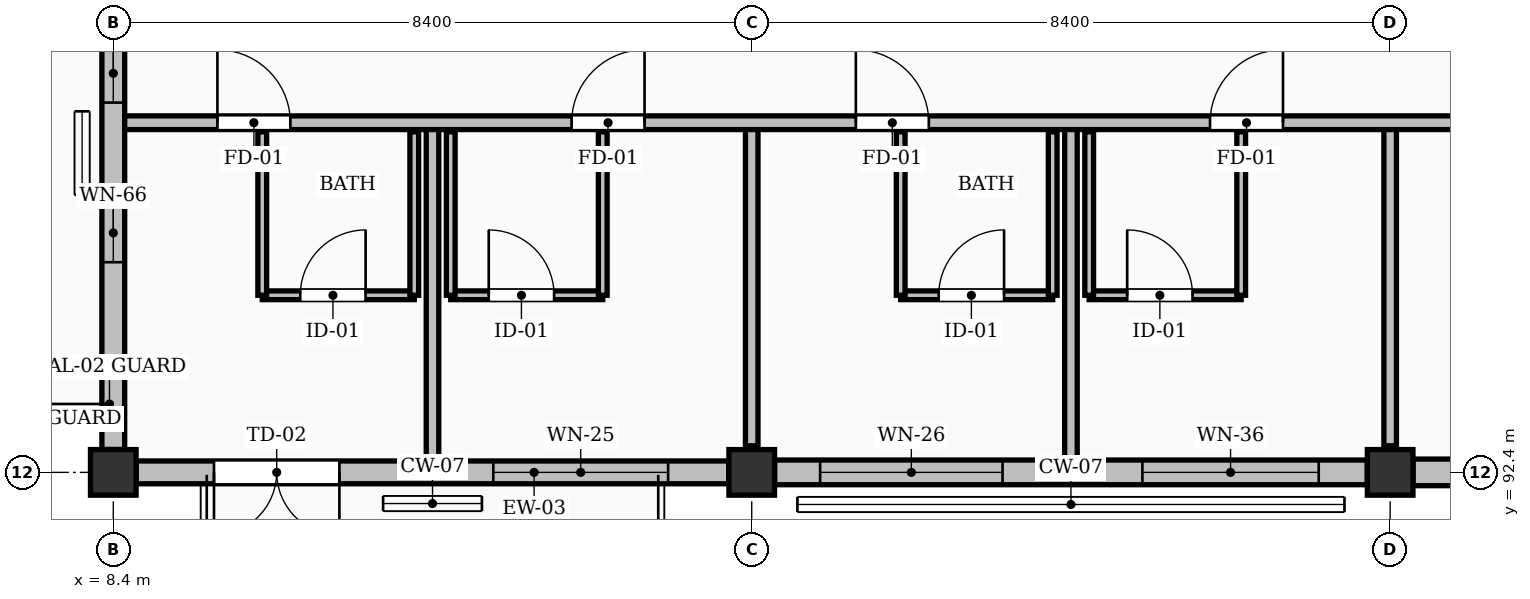
"""IFC4 building model, lengths in metres.
Left out: names, types, materials, properties, quantities, classifications, styles, units other than length and angle.
Written with IfcOpenShell. Run it as: python <this file> out.ifc"""

import sys

from ifc_helpers import new_model, si_unit, direction, frame, frame_2d, origin, origin_2d, place, context, subcontext, project, spatial, rectangle, extrude, element, fill, save


model = new_model("IFC4")
c1 = context("Model", 3, precision=1e-05, world=origin(), true_north=direction((0.0, 1.0)))
c2 = subcontext(c1, "Body", "Model", "MODEL_VIEW")
j1 = project(units=[si_unit("LENGTHUNIT", "METRE"), si_unit("PLANEANGLEUNIT", "RADIAN")], contexts=[c1])
p1 = place(None, origin())
s1 = spatial("IfcSite", under=j1, at=p1, CompositionType="ELEMENT")
p2 = place(p1, origin())
s2 = spatial("IfcBuilding", under=s1, at=p2, CompositionType="ELEMENT")
p3 = place(p2, frame((0.0, 0.0, 28.56)))
s3 = spatial("IfcBuildingStorey", under=s2, at=p3, CompositionType="ELEMENT", Elevation=28.56)
for number, where, z_axis, x_axis in (
    (1, (8.4, 92.4, 0.0), (0.0, 0.0, 1.0), (1.0, 0.0, 0.0)),
    (2, (16.8, 92.4, 0.0), (0.0, 0.0, 1.0), (1.0, 0.0, 0.0)),
    (3, (25.2, 92.4, 0.0), (0.0, 0.0, 1.0), (1.0, 0.0, 0.0)),
):
    element("IfcColumn", number, at=place(p3, frame(where, z_axis=z_axis, x_axis=x_axis)), inside=s3, PredefinedType="COLUMN", context=c2, shape_type="SweptSolid", body=[
        extrude(rectangle(XDim=0.6, YDim=0.6, at=origin_2d()), origin(), (0.0, 0.0, 1.0), 3.36),
    ])
p4 = place(p3, frame((8.701, 92.4, 0.0), z_axis=(0.0, 0.0, 1.0), x_axis=(1.0, 0.0, 0.0)))
e4 = element("IfcWall", 4, at=p4, inside=s3, PredefinedType="SOLIDWALL", context=c2, shape_type="SweptSolid", body=[
    extrude(rectangle(XDim=7.798, YDim=0.3, at=frame_2d((3.899, 0.0))), origin(), (0.0, 0.0, 1.0), 2.494),
])
p5 = place(p4, frame((1.024, 0.0, 0.0)))
e5 = element("IfcOpeningElement", 5, at=p5, cuts=e4, PredefinedType="OPENING", context=c2, shape_type="SweptSolid", body=[
    extrude(rectangle(XDim=1.65, YDim=2.08, at=frame_2d((0.825, 1.04))), frame((0.0, 0.16, 0.0), z_axis=(0.0, -1.0, 0.0), x_axis=(1.0, 0.0, 0.0)), (0.0, 0.0, 1.0), 0.32),
])
p6 = place(p4, frame((4.699, 0.0, 0.25)))
e6 = element("IfcOpeningElement", 6, at=p6, cuts=e4, PredefinedType="OPENING", context=c2, shape_type="SweptSolid", body=[
    extrude(rectangle(XDim=2.3, YDim=1.75, at=frame_2d((1.15, 0.875))), frame((0.0, 0.16, 0.0), z_axis=(0.0, -1.0, 0.0), x_axis=(1.0, 0.0, 0.0)), (0.0, 0.0, 1.0), 0.32),
])
p7 = place(p3, frame((17.101, 92.4, 0.0), z_axis=(0.0, 0.0, 1.0), x_axis=(1.0, 0.0, 0.0)))
e7 = element("IfcWall", 7, at=p7, inside=s3, PredefinedType="SOLIDWALL", context=c2, shape_type="SweptSolid", body=[
    extrude(rectangle(XDim=7.798, YDim=0.325, at=frame_2d((3.899, 0.0))), origin(), (0.0, 0.0, 1.0), 2.494),
])
p8 = place(p7, frame((0.599, 0.0, 0.25)))
e8 = element("IfcOpeningElement", 8, at=p8, cuts=e7, PredefinedType="OPENING", context=c2, shape_type="SweptSolid", body=[
    extrude(rectangle(XDim=2.4, YDim=1.75, at=frame_2d((1.2, 0.875))), frame((0.0, 0.172, 0.0), z_axis=(0.0, -1.0, 0.0), x_axis=(1.0, 0.0, 0.0)), (0.0, 0.0, 1.0), 0.345),
])
p9 = place(p7, frame((4.839, 0.0, 0.25)))
e9 = element("IfcOpeningElement", 9, at=p9, cuts=e7, PredefinedType="OPENING", context=c2, shape_type="SweptSolid", body=[
    extrude(rectangle(XDim=2.32, YDim=1.9, at=frame_2d((1.16, 0.95))), frame((0.0, 0.172, 0.0), z_axis=(0.0, -1.0, 0.0), x_axis=(1.0, 0.0, 0.0)), (0.0, 0.0, 1.0), 0.345),
])
p10 = place(p3, frame((25.501, 92.4, 0.0), z_axis=(0.0, 0.0, 1.0), x_axis=(1.0, 0.0, 0.0)))
e10 = element("IfcWall", 10, at=p10, inside=s3, PredefinedType="SOLIDWALL", context=c2, shape_type="SweptSolid", body=[
    extrude(rectangle(XDim=7.798, YDim=0.35, at=frame_2d((3.899, 0.0))), origin(), (0.0, 0.0, 1.0), 2.494),
])
p11 = place(p10, frame((0.974, 0.0, 0.0)))
e11 = element("IfcOpeningElement", 11, at=p11, cuts=e10, PredefinedType="OPENING", context=c2, shape_type="SweptSolid", body=[
    extrude(rectangle(XDim=1.75, YDim=2.08, at=frame_2d((0.875, 1.04))), frame((0.0, 0.185, 0.0), z_axis=(0.0, -1.0, 0.0), x_axis=(1.0, 0.0, 0.0)), (0.0, 0.0, 1.0), 0.37),
])
p12 = place(p10, frame((4.689, 0.0, 0.25)))
e12 = element("IfcOpeningElement", 12, at=p12, cuts=e10, PredefinedType="OPENING", context=c2, shape_type="SweptSolid", body=[
    extrude(rectangle(XDim=2.32, YDim=1.9, at=frame_2d((1.16, 0.95))), frame((0.0, 0.185, 0.0), z_axis=(0.0, -1.0, 0.0), x_axis=(1.0, 0.0, 0.0)), (0.0, 0.0, 1.0), 0.37),
])
p13 = place(p3, frame((8.4, 92.701, 0.0), z_axis=(0.0, 0.0, 1.0), x_axis=(0.0, 1.0, 0.0)))
e13 = element("IfcWall", 13, at=p13, inside=s3, PredefinedType="SOLIDWALL", context=c2, shape_type="SweptSolid", body=[
    extrude(rectangle(XDim=7.798, YDim=0.3, at=frame_2d((3.899, 0.0))), origin(), (0.0, 0.0, 1.0), 2.494),
])
p14 = place(p13, frame((2.464, 0.0, 0.3)))
e14 = element("IfcOpeningElement", 14, at=p14, cuts=e13, PredefinedType="OPENING", context=c2, shape_type="SweptSolid", body=[
    extrude(rectangle(XDim=0.77, YDim=1.9, at=frame_2d((0.385, 0.95))), frame((0.0, 0.16, 0.0), z_axis=(0.0, -1.0, 0.0), x_axis=(1.0, 0.0, 0.0)), (0.0, 0.0, 1.0), 0.32),
])
p15 = place(p13, frame((4.564, 0.0, 0.3)))
e15 = element("IfcOpeningElement", 15, at=p15, cuts=e13, PredefinedType="OPENING", context=c2, shape_type="SweptSolid", body=[
    extrude(rectangle(XDim=0.77, YDim=1.9, at=frame_2d((0.385, 0.95))), frame((0.0, 0.16, 0.0), z_axis=(0.0, -1.0, 0.0), x_axis=(1.0, 0.0, 0.0)), (0.0, 0.0, 1.0), 0.32),
])
p16 = place(p3, frame((10.36, 94.73, 0.0), z_axis=(0.0, 0.0, 1.0), x_axis=(1.0, 0.0, 0.0)))
e16 = element("IfcWall", 16, at=p16, inside=s3, PredefinedType="PARTITIONING", context=c2, shape_type="SweptSolid", body=[
    extrude(rectangle(XDim=2.0, YDim=0.115, at=frame_2d((1.0, 0.0))), origin(), (0.0, 0.0, 1.0), 3.12),
])
p17 = place(p16, frame((0.5, 0.0, 0.0)))
e17 = element("IfcOpeningElement", 17, at=p17, cuts=e16, PredefinedType="OPENING", context=c2, shape_type="SweptSolid", body=[
    extrude(rectangle(XDim=0.86, YDim=2.05, at=frame_2d((0.43, 1.025))), frame((0.0, 0.067, 0.0), z_axis=(0.0, -1.0, 0.0), x_axis=(1.0, 0.0, 0.0)), (0.0, 0.0, 1.0), 0.135),
])
for number, where, z_axis, x_axis in (
    (18, (10.36, 94.73, 0.0), (0.0, 0.0, 1.0), (0.0, 1.0, 0.0)),
    (19, (12.36, 94.73, 0.0), (0.0, 0.0, 1.0), (0.0, 1.0, 0.0)),
):
    element("IfcWall", number, at=place(p3, frame(where, z_axis=z_axis, x_axis=x_axis)), inside=s3, PredefinedType="PARTITIONING", context=c2, shape_type="SweptSolid", body=[
        extrude(rectangle(XDim=2.15, YDim=0.115, at=frame_2d((1.075, 0.0))), origin(), (0.0, 0.0, 1.0), 3.12),
    ])
p18 = place(p3, frame((12.84, 94.73, 0.0), z_axis=(0.0, 0.0, 1.0), x_axis=(1.0, 0.0, 0.0)))
e20 = element("IfcWall", 20, at=p18, inside=s3, PredefinedType="PARTITIONING", context=c2, shape_type="SweptSolid", body=[
    extrude(rectangle(XDim=2.0, YDim=0.115, at=frame_2d((1.0, 0.0))), origin(), (0.0, 0.0, 1.0), 3.12),
])
p19 = place(p18, frame((0.5, 0.0, 0.0)))
e21 = element("IfcOpeningElement", 21, at=p19, cuts=e20, PredefinedType="OPENING", context=c2, shape_type="SweptSolid", body=[
    extrude(rectangle(XDim=0.86, YDim=2.05, at=frame_2d((0.43, 1.025))), frame((0.0, 0.067, 0.0), z_axis=(0.0, -1.0, 0.0), x_axis=(1.0, 0.0, 0.0)), (0.0, 0.0, 1.0), 0.135),
])
for number, where, z_axis, x_axis in (
    (22, (12.84, 94.73, 0.0), (0.0, 0.0, 1.0), (0.0, 1.0, 0.0)),
    (23, (14.84, 94.73, 0.0), (0.0, 0.0, 1.0), (0.0, 1.0, 0.0)),
):
    element("IfcWall", number, at=place(p3, frame(where, z_axis=z_axis, x_axis=x_axis)), inside=s3, PredefinedType="PARTITIONING", context=c2, shape_type="SweptSolid", body=[
        extrude(rectangle(XDim=2.15, YDim=0.115, at=frame_2d((1.075, 0.0))), origin(), (0.0, 0.0, 1.0), 3.12),
    ])
p20 = place(p3, frame((12.6, 92.55, 0.0), z_axis=(0.0, 0.0, 1.0), x_axis=(0.0, 1.0, 0.0)))
e24 = element("IfcWall", 24, at=p20, inside=s3, PredefinedType="PARTITIONING", context=c2, shape_type="SweptSolid", body=[
    extrude(rectangle(XDim=4.45, YDim=0.165, at=frame_2d((2.225, 0.0))), origin(), (0.0, 0.0, 1.0), 3.12),
])
p21 = place(p3, frame((18.76, 94.73, 0.0), z_axis=(0.0, 0.0, 1.0), x_axis=(1.0, 0.0, 0.0)))
e25 = element("IfcWall", 25, at=p21, inside=s3, PredefinedType="PARTITIONING", context=c2, shape_type="SweptSolid", body=[
    extrude(rectangle(XDim=2.0, YDim=0.115, at=frame_2d((1.0, 0.0))), origin(), (0.0, 0.0, 1.0), 3.12),
])
p22 = place(p21, frame((0.5, 0.0, 0.0)))
e26 = element("IfcOpeningElement", 26, at=p22, cuts=e25, PredefinedType="OPENING", context=c2, shape_type="SweptSolid", body=[
    extrude(rectangle(XDim=0.86, YDim=2.05, at=frame_2d((0.43, 1.025))), frame((0.0, 0.067, 0.0), z_axis=(0.0, -1.0, 0.0), x_axis=(1.0, 0.0, 0.0)), (0.0, 0.0, 1.0), 0.135),
])
p23 = place(p3, frame((18.76, 94.73, 0.0), z_axis=(0.0, 0.0, 1.0), x_axis=(0.0, 1.0, 0.0)))
e27 = element("IfcWall", 27, at=p23, inside=s3, PredefinedType="PARTITIONING", context=c2, shape_type="SweptSolid", body=[
    extrude(rectangle(XDim=2.15, YDim=0.115, at=frame_2d((1.075, 0.0))), origin(), (0.0, 0.0, 1.0), 2.642),
])
p24 = place(p3, frame((20.76, 94.73, 0.0), z_axis=(0.0, 0.0, 1.0), x_axis=(0.0, 1.0, 0.0)))
e28 = element("IfcWall", 28, at=p24, inside=s3, PredefinedType="PARTITIONING", context=c2, shape_type="SweptSolid", body=[
    extrude(rectangle(XDim=2.15, YDim=0.115, at=frame_2d((1.075, 0.0))), origin(), (0.0, 0.0, 1.0), 3.12),
])
p25 = place(p3, frame((21.24, 94.73, 0.0), z_axis=(0.0, 0.0, 1.0), x_axis=(1.0, 0.0, 0.0)))
e29 = element("IfcWall", 29, at=p25, inside=s3, PredefinedType="PARTITIONING", context=c2, shape_type="SweptSolid", body=[
    extrude(rectangle(XDim=2.0, YDim=0.115, at=frame_2d((1.0, 0.0))), origin(), (0.0, 0.0, 1.0), 3.12),
])
p26 = place(p25, frame((0.5, 0.0, 0.0)))
e30 = element("IfcOpeningElement", 30, at=p26, cuts=e29, PredefinedType="OPENING", context=c2, shape_type="SweptSolid", body=[
    extrude(rectangle(XDim=0.86, YDim=2.05, at=frame_2d((0.43, 1.025))), frame((0.0, 0.067, 0.0), z_axis=(0.0, -1.0, 0.0), x_axis=(1.0, 0.0, 0.0)), (0.0, 0.0, 1.0), 0.135),
])
p27 = place(p3, frame((21.24, 94.73, 0.0), z_axis=(0.0, 0.0, 1.0), x_axis=(0.0, 1.0, 0.0)))
e31 = element("IfcWall", 31, at=p27, inside=s3, PredefinedType="PARTITIONING", context=c2, shape_type="SweptSolid", body=[
    extrude(rectangle(XDim=2.15, YDim=0.115, at=frame_2d((1.075, 0.0))), origin(), (0.0, 0.0, 1.0), 3.12),
])
p28 = place(p3, frame((23.24, 94.73, 0.0), z_axis=(0.0, 0.0, 1.0), x_axis=(0.0, 1.0, 0.0)))
e32 = element("IfcWall", 32, at=p28, inside=s3, PredefinedType="PARTITIONING", context=c2, shape_type="SweptSolid", body=[
    extrude(rectangle(XDim=2.15, YDim=0.115, at=frame_2d((1.075, 0.0))), origin(), (0.0, 0.0, 1.0), 2.642),
])
p29 = place(p3, frame((21.0, 92.562, 0.0), z_axis=(0.0, 0.0, 1.0), x_axis=(0.0, 1.0, 0.0)))
e33 = element("IfcWall", 33, at=p29, inside=s3, PredefinedType="PARTITIONING", context=c2, shape_type="SweptSolid", body=[
    extrude(rectangle(XDim=4.438, YDim=0.165, at=frame_2d((2.219, 0.0))), origin(), (0.0, 0.0, 1.0), 3.12),
])
for number, where, z_axis, x_axis in (
    (34, (16.8, 92.75, 0.0), (0.0, 0.0, 1.0), (0.0, 1.0, 0.0)),
    (35, (25.2, 92.75, 0.0), (0.0, 0.0, 1.0), (0.0, 1.0, 0.0)),
):
    element("IfcWall", number, at=place(p3, frame(where, z_axis=z_axis, x_axis=x_axis)), inside=s3, PredefinedType="PARTITIONING", context=c2, shape_type="SweptSolid", body=[
        extrude(rectangle(XDim=4.25, YDim=0.165, at=frame_2d((2.125, 0.0))), origin(), (0.0, 0.0, 1.0), 2.455),
    ])
p30 = place(p3, frame((8.55, 97.0, 0.0), z_axis=(0.0, 0.0, 1.0), x_axis=(1.0, 0.0, 0.0)))
e36 = element("IfcWall", 36, at=p30, inside=s3, PredefinedType="PARTITIONING", context=c2, shape_type="SweptSolid", body=[
    extrude(rectangle(XDim=41.85, YDim=0.18, at=frame_2d((20.925, 0.0))), origin(), (0.0, 0.0, 1.0), 3.12),
])
p31 = place(p30, frame((1.22, 0.0, 0.0)))
e37 = element("IfcOpeningElement", 37, at=p31, cuts=e36, PredefinedType="OPENING", context=c2, shape_type="SweptSolid", body=[
    extrude(rectangle(XDim=0.96, YDim=2.15, at=frame_2d((0.48, 1.075))), frame((0.0, 0.1, 0.0), z_axis=(0.0, -1.0, 0.0), x_axis=(1.0, 0.0, 0.0)), (0.0, 0.0, 1.0), 0.2),
])
p32 = place(p30, frame((5.88, 0.0, 0.0)))
e38 = element("IfcOpeningElement", 38, at=p32, cuts=e36, PredefinedType="OPENING", context=c2, shape_type="SweptSolid", body=[
    extrude(rectangle(XDim=0.96, YDim=2.15, at=frame_2d((0.48, 1.075))), frame((0.0, 0.1, 0.0), z_axis=(0.0, -1.0, 0.0), x_axis=(1.0, 0.0, 0.0)), (0.0, 0.0, 1.0), 0.2),
])
p33 = place(p30, frame((9.62, 0.0, 0.0)))
e39 = element("IfcOpeningElement", 39, at=p33, cuts=e36, PredefinedType="OPENING", context=c2, shape_type="SweptSolid", body=[
    extrude(rectangle(XDim=0.96, YDim=2.15, at=frame_2d((0.48, 1.075))), frame((0.0, 0.1, 0.0), z_axis=(0.0, -1.0, 0.0), x_axis=(1.0, 0.0, 0.0)), (0.0, 0.0, 1.0), 0.2),
])
p34 = place(p30, frame((14.28, 0.0, 0.0)))
e40 = element("IfcOpeningElement", 40, at=p34, cuts=e36, PredefinedType="OPENING", context=c2, shape_type="SweptSolid", body=[
    extrude(rectangle(XDim=0.96, YDim=2.15, at=frame_2d((0.48, 1.075))), frame((0.0, 0.1, 0.0), z_axis=(0.0, -1.0, 0.0), x_axis=(1.0, 0.0, 0.0)), (0.0, 0.0, 1.0), 0.2),
])
p35 = place(p30, frame((18.02, 0.0, 0.0)))
e41 = element("IfcOpeningElement", 41, at=p35, cuts=e36, PredefinedType="OPENING", context=c2, shape_type="SweptSolid", body=[
    extrude(rectangle(XDim=0.96, YDim=2.15, at=frame_2d((0.48, 1.075))), frame((0.0, 0.1, 0.0), z_axis=(0.0, -1.0, 0.0), x_axis=(1.0, 0.0, 0.0)), (0.0, 0.0, 1.0), 0.2),
])
p36 = place(p30, frame((22.68, 0.0, 0.0)))
e42 = element("IfcOpeningElement", 42, at=p36, cuts=e36, PredefinedType="OPENING", context=c2, shape_type="SweptSolid", body=[
    extrude(rectangle(XDim=0.96, YDim=2.15, at=frame_2d((0.48, 1.075))), frame((0.0, 0.1, 0.0), z_axis=(0.0, -1.0, 0.0), x_axis=(1.0, 0.0, 0.0)), (0.0, 0.0, 1.0), 0.2),
])
p37 = place(p30, frame((28.45, 0.0, 0.0)))
e43 = element("IfcOpeningElement", 43, at=p37, cuts=e36, PredefinedType="OPENING", context=c2, shape_type="SweptSolid", body=[
    extrude(rectangle(XDim=1.62, YDim=2.2, at=frame_2d((0.81, 1.1))), frame((0.0, 0.1, 0.0), z_axis=(0.0, -1.0, 0.0), x_axis=(1.0, 0.0, 0.0)), (0.0, 0.0, 1.0), 0.2),
])
p38 = place(p30, frame((34.82, 0.0, 0.0)))
e44 = element("IfcOpeningElement", 44, at=p38, cuts=e36, PredefinedType="OPENING", context=c2, shape_type="SweptSolid", body=[
    extrude(rectangle(XDim=0.96, YDim=2.15, at=frame_2d((0.48, 1.075))), frame((0.0, 0.1, 0.0), z_axis=(0.0, -1.0, 0.0), x_axis=(1.0, 0.0, 0.0)), (0.0, 0.0, 1.0), 0.2),
])
p39 = place(p30, frame((39.48, 0.0, 0.0)))
e45 = element("IfcOpeningElement", 45, at=p39, cuts=e36, PredefinedType="OPENING", context=c2, shape_type="SweptSolid", body=[
    extrude(rectangle(XDim=0.96, YDim=2.15, at=frame_2d((0.48, 1.075))), frame((0.0, 0.1, 0.0), z_axis=(0.0, -1.0, 0.0), x_axis=(1.0, 0.0, 0.0)), (0.0, 0.0, 1.0), 0.2),
])
p40 = place(p5, frame((1.65, 0.0, 0.0), z_axis=(0.0, 0.0, 1.0), x_axis=(-1.0, 0.0, 0.0)))
e46 = element("IfcDoor", 46, at=p40, inside=s3, OperationType="DOUBLE_DOOR_SINGLE_SWING", PredefinedType="DOOR", context=c2, shape_type="SweptSolid", body=[
    extrude(rectangle(XDim=1.65, YDim=2.08, at=frame_2d((0.825, 1.04))), frame((0.0, 0.025, 0.0), z_axis=(0.0, -1.0, 0.0), x_axis=(1.0, 0.0, 0.0)), (0.0, 0.0, 1.0), 0.05),
])
fill(e5, e46)
p41 = place(p6, origin())
e47 = element("IfcWindow", 47, at=p41, inside=s3, PartitioningType="DOUBLE_PANEL_VERTICAL", PredefinedType="WINDOW", context=c2, shape_type="SweptSolid", body=[
    extrude(rectangle(XDim=2.3, YDim=1.75, at=frame_2d((1.15, 0.875))), frame((0.0, 0.03, 0.0), z_axis=(0.0, -1.0, 0.0), x_axis=(1.0, 0.0, 0.0)), (0.0, 0.0, 1.0), 0.06),
])
fill(e6, e47)
p42 = place(p8, origin())
e48 = element("IfcWindow", 48, at=p42, inside=s3, PartitioningType="DOUBLE_PANEL_VERTICAL", PredefinedType="WINDOW", context=c2, shape_type="SweptSolid", body=[
    extrude(rectangle(XDim=2.4, YDim=1.75, at=frame_2d((1.2, 0.875))), frame((0.0, 0.03, 0.0), z_axis=(0.0, -1.0, 0.0), x_axis=(1.0, 0.0, 0.0)), (0.0, 0.0, 1.0), 0.06),
])
fill(e8, e48)
p43 = place(p9, origin())
e49 = element("IfcWindow", 49, at=p43, inside=s3, PartitioningType="DOUBLE_PANEL_VERTICAL", PredefinedType="WINDOW", context=c2, shape_type="SweptSolid", body=[
    extrude(rectangle(XDim=2.32, YDim=1.9, at=frame_2d((1.16, 0.95))), frame((0.0, 0.03, 0.0), z_axis=(0.0, -1.0, 0.0), x_axis=(1.0, 0.0, 0.0)), (0.0, 0.0, 1.0), 0.06),
])
fill(e9, e49)
p44 = place(p14, origin())
e50 = element("IfcWindow", 50, at=p44, inside=s3, PartitioningType="SINGLE_PANEL", PredefinedType="WINDOW", context=c2, shape_type="SweptSolid", body=[
    extrude(rectangle(XDim=0.77, YDim=1.9, at=frame_2d((0.385, 0.95))), frame((0.0, 0.03, 0.0), z_axis=(0.0, -1.0, 0.0), x_axis=(1.0, 0.0, 0.0)), (0.0, 0.0, 1.0), 0.06),
])
fill(e14, e50)
p45 = place(p15, origin())
e51 = element("IfcWindow", 51, at=p45, inside=s3, PartitioningType="SINGLE_PANEL", PredefinedType="WINDOW", context=c2, shape_type="SweptSolid", body=[
    extrude(rectangle(XDim=0.77, YDim=1.9, at=frame_2d((0.385, 0.95))), frame((0.0, 0.03, 0.0), z_axis=(0.0, -1.0, 0.0), x_axis=(1.0, 0.0, 0.0)), (0.0, 0.0, 1.0), 0.06),
])
fill(e15, e51)
p46 = place(p17, origin())
e52 = element("IfcDoor", 52, at=p46, inside=s3, OperationType="SINGLE_SWING_RIGHT", PredefinedType="DOOR", context=c2, shape_type="SweptSolid", body=[
    extrude(rectangle(XDim=0.86, YDim=2.05, at=frame_2d((0.43, 1.025))), frame((0.0, 0.025, 0.0), z_axis=(0.0, -1.0, 0.0), x_axis=(1.0, 0.0, 0.0)), (0.0, 0.0, 1.0), 0.05),
])
fill(e17, e52)
p47 = place(p19, origin())
e53 = element("IfcDoor", 53, at=p47, inside=s3, OperationType="SINGLE_SWING_LEFT", PredefinedType="DOOR", context=c2, shape_type="SweptSolid", body=[
    extrude(rectangle(XDim=0.86, YDim=2.05, at=frame_2d((0.43, 1.025))), frame((0.0, 0.025, 0.0), z_axis=(0.0, -1.0, 0.0), x_axis=(1.0, 0.0, 0.0)), (0.0, 0.0, 1.0), 0.05),
])
fill(e21, e53)
p48 = place(p22, origin())
e54 = element("IfcDoor", 54, at=p48, inside=s3, OperationType="SINGLE_SWING_RIGHT", PredefinedType="DOOR", context=c2, shape_type="SweptSolid", body=[
    extrude(rectangle(XDim=0.86, YDim=2.05, at=frame_2d((0.43, 1.025))), frame((0.0, 0.025, 0.0), z_axis=(0.0, -1.0, 0.0), x_axis=(1.0, 0.0, 0.0)), (0.0, 0.0, 1.0), 0.05),
])
fill(e26, e54)
p49 = place(p26, origin())
e55 = element("IfcDoor", 55, at=p49, inside=s3, OperationType="SINGLE_SWING_LEFT", PredefinedType="DOOR", context=c2, shape_type="SweptSolid", body=[
    extrude(rectangle(XDim=0.86, YDim=2.05, at=frame_2d((0.43, 1.025))), frame((0.0, 0.025, 0.0), z_axis=(0.0, -1.0, 0.0), x_axis=(1.0, 0.0, 0.0)), (0.0, 0.0, 1.0), 0.05),
])
fill(e30, e55)
p50 = place(p31, origin())
e56 = element("IfcDoor", 56, at=p50, inside=s3, OperationType="SINGLE_SWING_LEFT", PredefinedType="DOOR", context=c2, shape_type="SweptSolid", body=[
    extrude(rectangle(XDim=0.96, YDim=2.15, at=frame_2d((0.48, 1.075))), frame((0.0, 0.025, 0.0), z_axis=(0.0, -1.0, 0.0), x_axis=(1.0, 0.0, 0.0)), (0.0, 0.0, 1.0), 0.05),
])
fill(e37, e56)
p51 = place(p32, origin())
e57 = element("IfcDoor", 57, at=p51, inside=s3, OperationType="SINGLE_SWING_RIGHT", PredefinedType="DOOR", context=c2, shape_type="SweptSolid", body=[
    extrude(rectangle(XDim=0.96, YDim=2.15, at=frame_2d((0.48, 1.075))), frame((0.0, 0.025, 0.0), z_axis=(0.0, -1.0, 0.0), x_axis=(1.0, 0.0, 0.0)), (0.0, 0.0, 1.0), 0.05),
])
fill(e38, e57)
p52 = place(p33, origin())
e58 = element("IfcDoor", 58, at=p52, inside=s3, OperationType="SINGLE_SWING_LEFT", PredefinedType="DOOR", context=c2, shape_type="SweptSolid", body=[
    extrude(rectangle(XDim=0.96, YDim=2.15, at=frame_2d((0.48, 1.075))), frame((0.0, 0.025, 0.0), z_axis=(0.0, -1.0, 0.0), x_axis=(1.0, 0.0, 0.0)), (0.0, 0.0, 1.0), 0.05),
])
fill(e39, e58)
p53 = place(p34, origin())
e59 = element("IfcDoor", 59, at=p53, inside=s3, OperationType="SINGLE_SWING_RIGHT", PredefinedType="DOOR", context=c2, shape_type="SweptSolid", body=[
    extrude(rectangle(XDim=0.96, YDim=2.15, at=frame_2d((0.48, 1.075))), frame((0.0, 0.025, 0.0), z_axis=(0.0, -1.0, 0.0), x_axis=(1.0, 0.0, 0.0)), (0.0, 0.0, 1.0), 0.05),
])
fill(e40, e59)
save(model, sys.argv[1])
